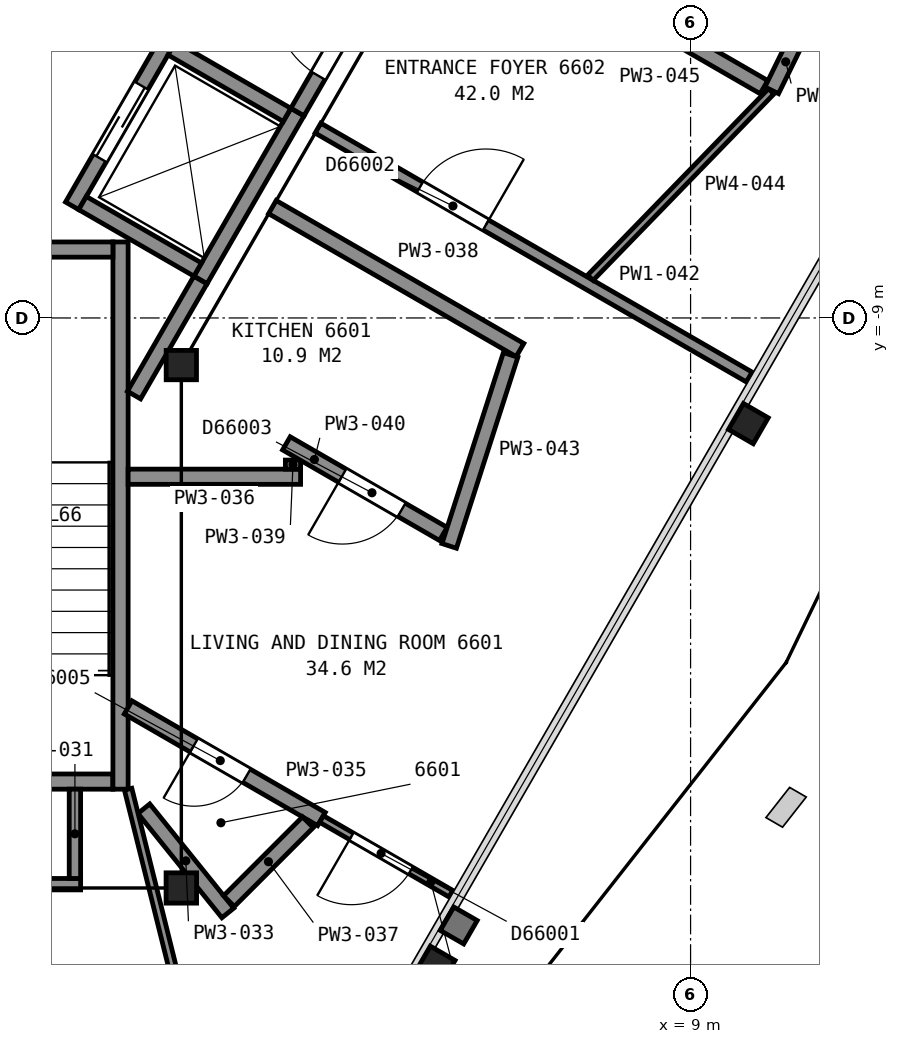
"""IFC4 building model, lengths in metres.
Left out: names, types, materials, properties, quantities, classifications, styles, units other than length and angle.
Written with IfcOpenShell. Run it as: python <this file> out.ifc"""

import sys

from ifc_helpers import new_model, si_unit, direction, frame, frame_2d, origin, origin_2d, place, context, subcontext, project, spatial, rectangle, i_section, extrude, element, fill, save


model = new_model("IFC4")
c1 = context("Model", 3, precision=1e-05, world=origin(), true_north=direction((0.0, 1.0)))
c2 = subcontext(c1, "Body", "Model", "MODEL_VIEW")
j1 = project(units=[si_unit("LENGTHUNIT", "METRE"), si_unit("PLANEANGLEUNIT", "RADIAN")], contexts=[c1])
p1 = place(None, origin())
s1 = spatial("IfcSite", under=j1, at=p1, CompositionType="ELEMENT")
p2 = place(p1, origin())
s2 = spatial("IfcBuilding", under=s1, at=p2, CompositionType="ELEMENT")
p3 = place(p2, frame((0.0, 0.0, 264.0)))
s3 = spatial("IfcBuildingStorey", under=s2, at=p3, CompositionType="ELEMENT", Elevation=264.0)
for number, where, z_axis, x_axis in (
    (1, (5.64, -17.53, 0.0), (0.0, 0.0, 1.0), (-0.5, -0.866, 0.0)),
    (2, (9.76, -10.39, 0.0), (0.0, 0.0, 1.0), (-0.5, -0.866, 0.0)),
):
    element("IfcColumn", number, at=place(p3, frame(where, z_axis=z_axis, x_axis=x_axis)), inside=s3, PredefinedType="COLUMN", context=c2, shape_type="SweptSolid", body=[
        extrude(i_section(OverallWidth=0.394, OverallDepth=0.376, WebThickness=0.017, FlangeThickness=0.028, FilletRadius=0.015, at=origin_2d()), origin(), (0.0, 0.0, 1.0), 3.7),
    ])
p4 = place(p3, frame((2.3, -16.5, 0.05), z_axis=(0.0, 0.0, 1.0), x_axis=(-1.0, 0.0, 0.0)))
e3 = element("IfcColumn", 3, at=p4, inside=s3, PredefinedType="COLUMN", context=c2, shape_type="SweptSolid", body=[
    extrude(i_section(OverallWidth=0.401, OverallDepth=0.399, WebThickness=0.025, FlangeThickness=0.04, FilletRadius=0.015, at=origin_2d()), origin(), (0.0, 0.0, 1.0), 3.65),
])
p5 = place(p3, frame((2.3, -9.62, 0.05), z_axis=(0.0, 0.0, 1.0), x_axis=(1.0, 0.0, 0.0)))
e4 = element("IfcColumn", 4, at=p5, inside=s3, PredefinedType="COLUMN", context=c2, shape_type="SweptSolid", body=[
    extrude(i_section(OverallWidth=0.399, OverallDepth=0.386, WebThickness=0.021, FlangeThickness=0.033, FilletRadius=0.015, at=origin_2d()), origin(), (0.0, 0.0, 1.0), 3.65),
])
p6 = place(p3, frame((-1.4, -15.1, 0.0), z_axis=(0.0, 0.0, 1.0), x_axis=(1.0, 0.0, 0.0)))
e5 = element("IfcWall", 5, at=p6, inside=s3, PredefinedType="PARTITIONING", context=c2, shape_type="SweptSolid", body=[
    extrude(rectangle(XDim=2.8, YDim=0.2, at=frame_2d((1.4, 0.0))), origin(), (0.0, 0.0, 1.0), 3.45),
])
p7 = place(p6, frame((0.85, 0.0, 0.0)))
e6 = element("IfcOpeningElement", 6, at=p7, cuts=e5, PredefinedType="OPENING", context=c2, shape_type="SweptSolid", body=[
    extrude(rectangle(XDim=1.1, YDim=2.1, at=frame_2d((0.55, 1.05))), frame((0.0, 0.11, 0.0), z_axis=(0.0, -1.0, 0.0), x_axis=(1.0, 0.0, 0.0)), (0.0, 0.0, 1.0), 0.22),
])
p8 = place(p3, frame((1.5, -8.0, 0.0), z_axis=(0.0, 0.0, 1.0), x_axis=(0.0, -1.0, 0.0)))
e7 = element("IfcWall", 7, at=p8, inside=s3, PredefinedType="PARTITIONING", context=c2, shape_type="SweptSolid", body=[
    extrude(rectangle(XDim=7.2, YDim=0.2, at=frame_2d((3.6, 0.0))), origin(), (0.0, 0.0, 1.0), 3.45),
])
p9 = place(p3, frame((-1.4, -8.1, 0.0), z_axis=(0.0, 0.0, 1.0), x_axis=(1.0, 0.0, 0.0)))
e8 = element("IfcWall", 8, at=p9, inside=s3, PredefinedType="PARTITIONING", context=c2, shape_type="SweptSolid", body=[
    extrude(rectangle(XDim=2.8, YDim=0.2, at=frame_2d((1.4, 0.0))), origin(), (0.0, 0.0, 1.0), 3.45),
])
p10 = place(p3, frame((2.552, -8.5, 0.0), z_axis=(0.0, 0.0, 1.0), x_axis=(0.499990435942, 0.866030925526, 0.0)))
e9 = element("IfcWall", 9, at=p10, inside=s3, PredefinedType="PARTITIONING", context=c2, shape_type="SweptSolid", body=[
    extrude(rectangle(XDim=2.55, YDim=0.2, at=frame_2d((1.275, 0.0))), origin(), (0.0, 0.0, 1.0), 3.7),
])
p11 = place(p3, frame((0.863, -7.525, 0.0), z_axis=(0.0, 0.0, 1.0), x_axis=(0.499990435942, 0.866030925526, 0.0)))
e10 = element("IfcWall", 10, at=p11, inside=s3, PredefinedType="PARTITIONING", context=c2, shape_type="SweptSolid", body=[
    extrude(rectangle(XDim=2.55, YDim=0.2, at=frame_2d((1.275, 0.0))), origin(), (0.0, 0.0, 1.0), 3.7),
])
p12 = place(p11, frame((0.725, 0.0, 0.0)))
e11 = element("IfcOpeningElement", 11, at=p12, cuts=e10, PredefinedType="OPENING", context=c2, shape_type="SweptSolid", body=[
    extrude(rectangle(XDim=1.1, YDim=2.1, at=frame_2d((0.55, 1.05))), frame((0.0, 0.11, 0.0), z_axis=(0.0, -1.0, 0.0), x_axis=(1.0, 0.0, 0.0)), (0.0, 0.0, 1.0), 0.22),
])
for number, where, z_axis, x_axis in (
    (12, (3.69, -6.328, 0.0), (0.0, 0.0, 1.0), (-0.866, 0.5, 0.0)),
    (13, (2.515, -8.363, 0.0), (0.0, 0.0, 1.0), (-0.866, 0.5, 0.0)),
):
    element("IfcWall", number, at=place(p3, frame(where, z_axis=z_axis, x_axis=x_axis)), inside=s3, PredefinedType="PARTITIONING", context=c2, shape_type="SweptSolid", body=[
        extrude(rectangle(XDim=1.75, YDim=0.2, at=frame_2d((0.875, 0.0))), origin(), (0.0, 0.0, 1.0), 3.7),
    ])
p13 = place(p3, frame((1.677, -10.015, 0.0), z_axis=(0.0, 0.0, 1.0), x_axis=(0.49983532306, 0.866120459187, 0.0)))
e14 = element("IfcWall", 14, at=p13, inside=s3, PredefinedType="PARTITIONING", context=c2, shape_type="SweptSolid", body=[
    extrude(rectangle(XDim=1.748, YDim=0.2, at=frame_2d((0.874, 0.0))), origin(), (0.0, 0.0, 1.0), 3.45),
])
p14 = place(p3, frame((3.828, -6.29, 0.0), z_axis=(0.0, 0.0, 1.0), x_axis=(0.499979739078, 0.866037101117, 0.0)))
e15 = element("IfcWall", 15, at=p14, inside=s3, PredefinedType="PARTITIONING", context=c2, shape_type="SweptSolid", body=[
    extrude(rectangle(XDim=11.363, YDim=0.2, at=frame_2d((5.681, 0.0))), origin(), (0.0, 0.0, 1.0), 3.45),
])
p15 = place(p14, frame((0.55, 0.0, 0.0)))
e16 = element("IfcOpeningElement", 16, at=p15, cuts=e15, PredefinedType="OPENING", context=c2, shape_type="SweptSolid", body=[
    extrude(rectangle(XDim=1.2, YDim=2.1, at=frame_2d((0.6, 1.05))), frame((0.0, 0.11, 0.0), z_axis=(0.0, -1.0, 0.0), x_axis=(1.0, 0.0, 0.0)), (0.0, 0.0, 1.0), 0.22),
])
p16 = place(p3, frame((-1.65, -16.45, 0.0), z_axis=(0.0, 0.0, 1.0), x_axis=(1.0, 0.0, 0.0)))
e17 = element("IfcWall", 17, at=p16, inside=s3, PredefinedType="PARTITIONING", context=c2, shape_type="SweptSolid", body=[
    extrude(rectangle(XDim=2.625, YDim=0.15, at=frame_2d((1.312, 0.0))), origin(), (0.0, 0.0, 1.0), 2.723),
])
p17 = place(p3, frame((0.9, -16.375, 0.0), z_axis=(0.0, 0.0, 1.0), x_axis=(0.0, 1.0, 0.0)))
e18 = element("IfcWall", 18, at=p17, inside=s3, PredefinedType="PARTITIONING", context=c2, shape_type="SweptSolid", body=[
    extrude(rectangle(XDim=1.175, YDim=0.15, at=frame_2d((0.587, 0.0))), origin(), (0.0, 0.0, 1.0), 2.723),
])
p18 = place(p3, frame((1.807, -15.457, 0.0), z_axis=(0.0, 0.0, 1.0), x_axis=(0.62721044395, -0.778849830841, 0.0)))
e19 = element("IfcWall", 19, at=p18, inside=s3, PredefinedType="PARTITIONING", context=c2, shape_type="SweptSolid", body=[
    extrude(rectangle(XDim=1.761, YDim=0.2, at=frame_2d((0.881, 0.0))), origin(), (0.0, 0.0, 1.0), 2.723),
])
p19 = place(p3, frame((3.127, -21.335, 0.0), z_axis=(0.0, 0.0, 1.0), x_axis=(-0.241554155251, 0.970387340231, 0.0)))
e20 = element("IfcWall", 20, at=p19, inside=s3, PredefinedType="PARTITIONING", context=c2, shape_type="SweptSolid", body=[
    extrude(rectangle(XDim=6.322, YDim=0.1, at=frame_2d((3.161, 0.0))), origin(), (0.0, 0.0, 1.0), 2.723),
])
p20 = place(p19, frame((2.722, 0.0, 0.0)))
e21 = element("IfcOpeningElement", 21, at=p20, cuts=e20, PredefinedType="OPENING", context=c2, shape_type="SweptSolid", body=[
    extrude(rectangle(XDim=1.0, YDim=2.1, at=frame_2d((0.5, 1.05))), frame((0.0, 0.06, 0.0), z_axis=(0.0, -1.0, 0.0), x_axis=(1.0, 0.0, 0.0)), (0.0, 0.0, 1.0), 0.12),
])
p21 = place(p3, frame((4.144, -15.593, 0.0), z_axis=(0.0, 0.0, 1.0), x_axis=(-0.865947474014, 0.500134954036, 0.0)))
e22 = element("IfcWall", 22, at=p21, inside=s3, PredefinedType="PARTITIONING", context=c2, shape_type="SweptSolid", body=[
    extrude(rectangle(XDim=2.937, YDim=0.2, at=frame_2d((1.469, 0.0))), origin(), (0.0, 0.0, 1.0), 2.723),
])
p22 = place(p21, frame((1.137, 0.0, 0.0)))
e23 = element("IfcOpeningElement", 23, at=p22, cuts=e22, PredefinedType="OPENING", context=c2, shape_type="SweptSolid", body=[
    extrude(rectangle(XDim=0.8, YDim=2.1, at=frame_2d((0.4, 1.05))), frame((0.0, 0.11, 0.0), z_axis=(0.0, -1.0, 0.0), x_axis=(1.0, 0.0, 0.0)), (0.0, 0.0, 1.0), 0.22),
])
p23 = place(p3, frame((1.6, -11.089, 0.0), z_axis=(0.0, 0.0, 1.0), x_axis=(1.0, 0.0, 0.0)))
e24 = element("IfcWall", 24, at=p23, inside=s3, PredefinedType="PARTITIONING", context=c2, shape_type="SweptSolid", body=[
    extrude(rectangle(XDim=2.269, YDim=0.2, at=frame_2d((1.134, 0.0))), origin(), (0.0, 0.0, 1.0), 2.723),
])
p24 = place(p3, frame((2.927, -16.673, 0.0), z_axis=(0.0, 0.0, 1.0), x_axis=(0.707106781187, 0.707106781187, 0.0)))
e25 = element("IfcWall", 25, at=p24, inside=s3, PredefinedType="PARTITIONING", context=c2, shape_type="SweptSolid", body=[
    extrude(rectangle(XDim=1.469, YDim=0.2, at=frame_2d((0.734, 0.0))), origin(), (0.0, 0.0, 1.0), 2.723),
])
p25 = place(p3, frame((3.498, -7.541, 0.0), z_axis=(0.0, 0.0, 1.0), x_axis=(0.865985624761, -0.500068892961, 0.0)))
e26 = element("IfcWall", 26, at=p25, inside=s3, PredefinedType="PARTITIONING", context=c2, shape_type="SweptSolid", body=[
    extrude(rectangle(XDim=3.762, YDim=0.2, at=frame_2d((1.881, 0.0))), origin(), (0.0, 0.0, 1.0), 2.723),
])
p26 = place(p3, frame((3.769, -10.989, 0.0), z_axis=(0.0, 0.0, 1.0), x_axis=(0.0, 1.0, 0.0)))
e27 = element("IfcWall", 27, at=p26, inside=s3, PredefinedType="PARTITIONING", context=c2, shape_type="SweptSolid", body=[
    extrude(rectangle(XDim=0.119, YDim=0.2, at=frame_2d((0.06, 0.0))), origin(), (0.0, 0.0, 1.0), 2.723),
])
p27 = place(p3, frame((3.682, -10.65, 0.0), z_axis=(0.0, 0.0, 1.0), x_axis=(0.86607302589, -0.499917507021, 0.0)))
e28 = element("IfcWall", 28, at=p27, inside=s3, PredefinedType="PARTITIONING", context=c2, shape_type="SweptSolid", body=[
    extrude(rectangle(XDim=2.384, YDim=0.2, at=frame_2d((1.192, 0.0))), origin(), (0.0, 0.0, 1.0), 2.723),
])
p28 = place(p27, frame((0.85, 0.0, 0.0)))
e29 = element("IfcOpeningElement", 29, at=p28, cuts=e28, PredefinedType="OPENING", context=c2, shape_type="SweptSolid", body=[
    extrude(rectangle(XDim=0.9, YDim=2.1, at=frame_2d((0.45, 1.05))), frame((0.0, 0.11, 0.0), z_axis=(0.0, -1.0, 0.0), x_axis=(1.0, 0.0, 0.0)), (0.0, 0.0, 1.0), 0.22),
])
p29 = place(p3, frame((5.847, -16.575, 0.0), z_axis=(0.0, 0.0, 1.0), x_axis=(-0.866156637233, 0.499772628079, 0.0)))
e30 = element("IfcWall", 30, at=p29, inside=s3, PredefinedType="PARTITIONING", context=c2, shape_type="SweptSolid", body=[
    extrude(rectangle(XDim=1.966, YDim=0.1, at=frame_2d((0.983, 0.0))), origin(), (0.0, 0.0, 1.0), 2.723),
])
p30 = place(p29, frame((0.611, 0.0, 0.0)))
e31 = element("IfcOpeningElement", 31, at=p30, cuts=e30, PredefinedType="OPENING", context=c2, shape_type="SweptSolid", body=[
    extrude(rectangle(XDim=0.9, YDim=2.1, at=frame_2d((0.45, 1.05))), frame((0.0, 0.06, 0.0), z_axis=(0.0, -1.0, 0.0), x_axis=(1.0, 0.0, 0.0)), (0.0, 0.0, 1.0), 0.12),
])
p31 = place(p3, frame((9.772, -9.777, 0.0), z_axis=(0.0, 0.0, 1.0), x_axis=(-0.866083818164, 0.499898809675, 0.0)))
e32 = element("IfcWall", 32, at=p31, inside=s3, PredefinedType="PARTITIONING", context=c2, shape_type="SweptSolid", body=[
    extrude(rectangle(XDim=6.551, YDim=0.15, at=frame_2d((3.275, 0.0))), origin(), (0.0, 0.0, 1.0), 2.723),
])
p32 = place(p31, frame((4.001, 0.0, 0.0)))
e33 = element("IfcOpeningElement", 33, at=p32, cuts=e32, PredefinedType="OPENING", context=c2, shape_type="SweptSolid", body=[
    extrude(rectangle(XDim=1.0, YDim=2.1, at=frame_2d((0.5, 1.05))), frame((0.0, 0.085, 0.0), z_axis=(0.0, -1.0, 0.0), x_axis=(1.0, 0.0, 0.0)), (0.0, 0.0, 1.0), 0.17),
])
p33 = place(p3, frame((5.824, -11.999, 0.0), z_axis=(0.0, 0.0, 1.0), x_axis=(0.306054089199, 0.95201412515, 0.0)))
e34 = element("IfcWall", 34, at=p33, inside=s3, PredefinedType="PARTITIONING", context=c2, shape_type="SweptSolid", body=[
    extrude(rectangle(XDim=2.64, YDim=0.2, at=frame_2d((1.32, 0.0))), origin(), (0.0, 0.0, 1.0), 2.723),
])
p34 = place(p3, frame((7.682, -8.47, 0.0), z_axis=(0.0, 0.0, 1.0), x_axis=(0.696344433623, 0.717707760696, 0.0)))
e35 = element("IfcWall", 35, at=p34, inside=s3, PredefinedType="PARTITIONING", context=c2, shape_type="SweptSolid", body=[
    extrude(rectangle(XDim=3.417, YDim=0.1, at=frame_2d((1.708, 0.0))), origin(), (0.0, 0.0, 1.0), 2.723),
])
p35 = place(p3, frame((8.325, -5.016, 0.0), z_axis=(0.0, 0.0, 1.0), x_axis=(0.866093293964, -0.499882392319, 0.0)))
e36 = element("IfcWall", 36, at=p35, inside=s3, PredefinedType="PARTITIONING", context=c2, shape_type="SweptSolid", body=[
    extrude(rectangle(XDim=1.894, YDim=0.2, at=frame_2d((0.947, 0.0))), origin(), (0.0, 0.0, 1.0), 2.723),
])
p36 = place(p3, frame((10.068, -6.005, 0.0), z_axis=(0.0, 0.0, 1.0), x_axis=(0.440614307878, 0.897696514248, 0.0)))
e37 = element("IfcWall", 37, at=p36, inside=s3, PredefinedType="PARTITIONING", context=c2, shape_type="SweptSolid", body=[
    extrude(rectangle(XDim=2.491, YDim=0.2, at=frame_2d((1.245, 0.0))), origin(), (0.0, 0.0, 1.0), 2.723),
])
p37 = place(p36, frame((0.835, 0.0, 0.0)))
e38 = element("IfcOpeningElement", 38, at=p37, cuts=e37, PredefinedType="OPENING", context=c2, shape_type="SweptSolid", body=[
    extrude(rectangle(XDim=0.9, YDim=2.1, at=frame_2d((0.45, 1.05))), frame((0.0, 0.11, 0.0), z_axis=(0.0, -1.0, 0.0), x_axis=(1.0, 0.0, 0.0)), (0.0, 0.0, 1.0), 0.22),
])
p38 = place(p12, origin())
e39 = element("IfcDoor", 39, at=p38, inside=s3, OperationType="SLIDING_TO_LEFT", PredefinedType="DOOR", context=c2, shape_type="SweptSolid", body=[
    extrude(rectangle(XDim=1.1, YDim=2.1, at=frame_2d((0.55, 1.05))), frame((0.0, 0.025, 0.0), z_axis=(0.0, -1.0, 0.0), x_axis=(1.0, 0.0, 0.0)), (0.0, 0.0, 1.0), 0.05),
])
fill(e11, e39)
p39 = place(p15, origin())
e40 = element("IfcDoor", 40, at=p39, inside=s3, OperationType="SINGLE_SWING_RIGHT", PredefinedType="DOOR", context=c2, shape_type="SweptSolid", body=[
    extrude(rectangle(XDim=1.2, YDim=2.1, at=frame_2d((0.6, 1.05))), frame((0.0, 0.025, 0.0), z_axis=(0.0, -1.0, 0.0), x_axis=(1.0, 0.0, 0.0)), (0.0, 0.0, 1.0), 0.05),
])
fill(e16, e40)
p40 = place(p22, origin())
e41 = element("IfcDoor", 41, at=p40, inside=s3, OperationType="SINGLE_SWING_RIGHT", PredefinedType="DOOR", context=c2, shape_type="SweptSolid", body=[
    extrude(rectangle(XDim=0.8, YDim=2.1, at=frame_2d((0.4, 1.05))), frame((0.0, 0.025, 0.0), z_axis=(0.0, -1.0, 0.0), x_axis=(1.0, 0.0, 0.0)), (0.0, 0.0, 1.0), 0.05),
])
fill(e23, e41)
p41 = place(p28, origin())
e42 = element("IfcDoor", 42, at=p41, inside=s3, OperationType="SINGLE_SWING_LEFT", PredefinedType="DOOR", context=c2, shape_type="SweptSolid", body=[
    extrude(rectangle(XDim=0.9, YDim=2.1, at=frame_2d((0.45, 1.05))), frame((0.0, 0.025, 0.0), z_axis=(0.0, -1.0, 0.0), x_axis=(1.0, 0.0, 0.0)), (0.0, 0.0, 1.0), 0.05),
])
fill(e29, e42)
p42 = place(p30, origin())
e43 = element("IfcDoor", 43, at=p42, inside=s3, OperationType="SINGLE_SWING_RIGHT", PredefinedType="DOOR", context=c2, shape_type="SweptSolid", body=[
    extrude(rectangle(XDim=0.9, YDim=2.1, at=frame_2d((0.45, 1.05))), frame((0.0, 0.025, 0.0), z_axis=(0.0, -1.0, 0.0), x_axis=(1.0, 0.0, 0.0)), (0.0, 0.0, 1.0), 0.05),
])
fill(e31, e43)
p43 = place(p32, origin())
e44 = element("IfcDoor", 44, at=p43, inside=s3, OperationType="SINGLE_SWING_LEFT", PredefinedType="DOOR", context=c2, shape_type="SweptSolid", body=[
    extrude(rectangle(XDim=1.0, YDim=2.1, at=frame_2d((0.5, 1.05))), frame((0.0, 0.025, 0.0), z_axis=(0.0, -1.0, 0.0), x_axis=(1.0, 0.0, 0.0)), (0.0, 0.0, 1.0), 0.05),
])
fill(e33, e44)
save(model, sys.argv[1])
